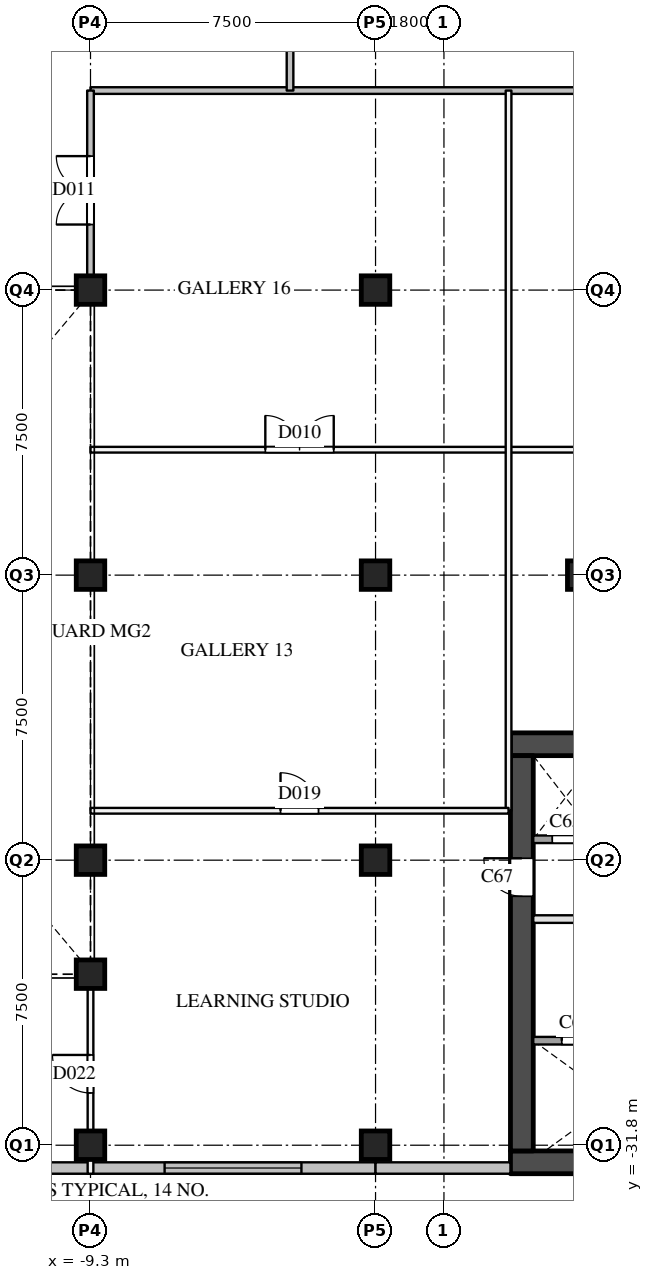
"""IFC4 building model, lengths in metres.
Left out: names, types, materials, properties, quantities, classifications, styles, units other than length and angle.
Written with IfcOpenShell. Run it as: python <this file> out.ifc"""

import sys

from ifc_helpers import new_model, si_unit, direction, frame, frame_2d, origin, origin_2d, place, context, subcontext, project, spatial, rectangle, extrude, element, fill, save


model = new_model("IFC4")
c1 = context("Model", 3, precision=1e-05, world=origin(), true_north=direction((0.0, 1.0)))
c2 = subcontext(c1, "Body", "Model", "MODEL_VIEW")
j1 = project(units=[si_unit("LENGTHUNIT", "METRE"), si_unit("PLANEANGLEUNIT", "RADIAN")], contexts=[c1])
p1 = place(None, origin())
s1 = spatial("IfcSite", under=j1, at=p1, CompositionType="ELEMENT")
p2 = place(p1, origin())
s2 = spatial("IfcBuilding", under=s1, at=p2, CompositionType="ELEMENT")
p3 = place(p2, frame((0.0, 0.0, 14.0)))
s3 = spatial("IfcBuildingStorey", under=s2, at=p3, CompositionType="ELEMENT", Elevation=14.0)
for number, where, z_axis, x_axis in (
    (1, (-9.3, -31.8, 0.0), (0.0, 0.0, 1.0), (1.0, 0.0, 0.0)),
    (2, (-9.3, -24.3, 0.0), (0.0, 0.0, 1.0), (1.0, 0.0, 0.0)),
    (3, (-9.3, -16.8, 0.0), (0.0, 0.0, 1.0), (1.0, 0.0, 0.0)),
    (4, (-9.3, -9.3, 0.0), (0.0, 0.0, 1.0), (1.0, 0.0, 0.0)),
    (5, (-1.8, -31.8, 0.0), (0.0, 0.0, 1.0), (1.0, 0.0, 0.0)),
):
    element("IfcColumn", number, at=place(p3, frame(where, z_axis=z_axis, x_axis=x_axis)), inside=s3, PredefinedType="COLUMN", context=c2, shape_type="SweptSolid", body=[
        extrude(rectangle(XDim=0.75, YDim=0.75, at=origin_2d()), origin(), (0.0, 0.0, 1.0), 7.0),
    ])
for number, where, z_axis, x_axis in (
    (6, (-1.8, -24.3, -0.41), (0.0, 0.0, 1.0), (1.0, 0.0, 0.0)),
    (7, (-1.8, -16.8, -0.41), (0.0, 0.0, 1.0), (1.0, 0.0, 0.0)),
    (8, (-1.8, -9.3, -0.41), (0.0, 0.0, 1.0), (1.0, 0.0, 0.0)),
):
    element("IfcColumn", number, at=place(p3, frame(where, z_axis=z_axis, x_axis=x_axis)), inside=s3, PredefinedType="COLUMN", context=c2, shape_type="SweptSolid", body=[
        extrude(rectangle(XDim=0.75, YDim=0.75, at=origin_2d()), origin(), (0.0, 0.0, 1.0), 7.41),
    ])
for number, where, z_axis, x_axis in (
    (9, (-9.3, -27.3, 0.0), (0.0, 0.0, 1.0), (1.0, 0.0, 0.0)),
    (10, (3.625, -16.8, 0.0), (0.0, 0.0, 1.0), (1.0, 0.0, 0.0)),
):
    element("IfcColumn", number, at=place(p3, frame(where, z_axis=z_axis, x_axis=x_axis)), inside=s3, PredefinedType="COLUMN", context=c2, shape_type="SweptSolid", body=[
        extrude(rectangle(XDim=0.75, YDim=0.75, at=origin_2d()), origin(), (0.0, 0.0, 1.0), 7.0),
    ])
p4 = place(p3, frame((-16.8, -32.4, 0.0), z_axis=(0.0, 0.0, 1.0), x_axis=(1.0, 0.0, 0.0)))
e11 = element("IfcWall", 11, at=p4, inside=s3, PredefinedType="SOLIDWALL", context=c2, shape_type="SweptSolid", body=[
    extrude(rectangle(XDim=7.5, YDim=0.3, at=frame_2d((3.75, 0.0))), origin(), (0.0, 0.0, 1.0), 6.59),
])
p5 = place(p4, frame((1.95, 0.0, 0.9)))
e12 = element("IfcOpeningElement", 12, at=p5, cuts=e11, PredefinedType="OPENING", context=c2, shape_type="SweptSolid", body=[
    extrude(rectangle(XDim=3.6, YDim=3.0, at=frame_2d((1.8, 1.5))), frame((0.0, 0.16, 0.0), z_axis=(0.0, -1.0, 0.0), x_axis=(1.0, 0.0, 0.0)), (0.0, 0.0, 1.0), 0.32),
])
p6 = place(p3, frame((-9.3, -32.4, 0.0), z_axis=(0.0, 0.0, 1.0), x_axis=(1.0, 0.0, 0.0)))
e13 = element("IfcWall", 13, at=p6, inside=s3, PredefinedType="SOLIDWALL", context=c2, shape_type="SweptSolid", body=[
    extrude(rectangle(XDim=7.5, YDim=0.3, at=frame_2d((3.75, 0.0))), origin(), (0.0, 0.0, 1.0), 6.59),
])
p7 = place(p6, frame((1.95, 0.0, 0.9)))
e14 = element("IfcOpeningElement", 14, at=p7, cuts=e13, PredefinedType="OPENING", context=c2, shape_type="SweptSolid", body=[
    extrude(rectangle(XDim=3.6, YDim=3.0, at=frame_2d((1.8, 1.5))), frame((0.0, 0.16, 0.0), z_axis=(0.0, -1.0, 0.0), x_axis=(1.0, 0.0, 0.0)), (0.0, 0.0, 1.0), 0.32),
])
p8 = place(p3, frame((-1.8, -32.4, 0.0), z_axis=(0.0, 0.0, 1.0), x_axis=(1.0, 0.0, 0.0)))
e15 = element("IfcWall", 15, at=p8, inside=s3, PredefinedType="SOLIDWALL", context=c2, shape_type="SweptSolid", body=[
    extrude(rectangle(XDim=3.55, YDim=0.3, at=frame_2d((1.775, 0.0))), origin(), (0.0, 0.0, 1.0), 6.59),
])
for number, where, z_axis, x_axis in (
    (16, (1.75, -32.25, 0.0), (0.0, 0.0, 1.0), (1.0, 0.0, 0.0)),
    (17, (1.75, -21.25, 0.0), (0.0, 0.0, 1.0), (1.0, 0.0, 0.0)),
):
    element("IfcWall", number, at=place(p3, frame(where, z_axis=z_axis, x_axis=x_axis)), inside=s3, PredefinedType="SHEAR", context=c2, shape_type="SweptSolid", body=[
        extrude(rectangle(XDim=12.2, YDim=0.6, at=frame_2d((6.1, 0.0))), origin(), (0.0, 0.0, 1.0), 6.59),
    ])
p9 = place(p3, frame((2.05, -31.95, 0.0), z_axis=(0.0, 0.0, 1.0), x_axis=(0.0, 1.0, 0.0)))
e18 = element("IfcWall", 18, at=p9, inside=s3, PredefinedType="SHEAR", context=c2, shape_type="SweptSolid", body=[
    extrude(rectangle(XDim=10.4, YDim=0.6, at=frame_2d((5.2, 0.0))), origin(), (0.0, 0.0, 1.0), 6.59),
])
p10 = place(p9, frame((6.7, 0.0, 0.0)))
e19 = element("IfcOpeningElement", 19, at=p10, cuts=e18, PredefinedType="OPENING", context=c2, shape_type="SweptSolid", body=[
    extrude(rectangle(XDim=1.0, YDim=2.1, at=frame_2d((0.5, 1.05))), frame((0.0, 0.31, 0.0), z_axis=(0.0, -1.0, 0.0), x_axis=(1.0, 0.0, 0.0)), (0.0, 0.0, 1.0), 0.62),
])
p11 = place(p3, frame((2.35, -29.05, 0.0), z_axis=(0.0, 0.0, 1.0), x_axis=(1.0, 0.0, 0.0)))
e20 = element("IfcWall", 20, at=p11, inside=s3, PredefinedType="SOLIDWALL", context=c2, shape_type="SweptSolid", body=[
    extrude(rectangle(XDim=4.3, YDim=0.2, at=frame_2d((2.15, 0.0))), origin(), (0.0, 0.0, 1.0), 6.59),
])
p12 = place(p11, frame((2.65, 0.0, 0.0)))
e21 = element("IfcOpeningElement", 21, at=p12, cuts=e20, PredefinedType="OPENING", context=c2, shape_type="SweptSolid", body=[
    extrude(rectangle(XDim=1.2, YDim=2.1, at=frame_2d((0.6, 1.05))), frame((0.0, 0.11, 0.0), z_axis=(0.0, -1.0, 0.0), x_axis=(1.0, 0.0, 0.0)), (0.0, 0.0, 1.0), 0.22),
])
p13 = place(p11, frame((0.75, 0.0, 0.0)))
e22 = element("IfcOpeningElement", 22, at=p13, cuts=e20, PredefinedType="OPENING", context=c2, shape_type="SweptSolid", body=[
    extrude(rectangle(XDim=0.7, YDim=2.1, at=frame_2d((0.35, 1.05))), frame((0.0, 0.11, 0.0), z_axis=(0.0, -1.0, 0.0), x_axis=(1.0, 0.0, 0.0)), (0.0, 0.0, 1.0), 0.22),
])
p14 = place(p3, frame((2.35, -25.85, 0.0), z_axis=(0.0, 0.0, 1.0), x_axis=(1.0, 0.0, 0.0)))
e23 = element("IfcWall", 23, at=p14, inside=s3, PredefinedType="PARTITIONING", context=c2, shape_type="SweptSolid", body=[
    extrude(rectangle(XDim=4.3, YDim=0.2, at=frame_2d((2.15, 0.0))), origin(), (0.0, 0.0, 1.0), 6.59),
])
p15 = place(p14, frame((1.15, 0.0, 0.0)))
e24 = element("IfcOpeningElement", 24, at=p15, cuts=e23, PredefinedType="OPENING", context=c2, shape_type="SweptSolid", body=[
    extrude(rectangle(XDim=1.8, YDim=2.1, at=frame_2d((0.9, 1.05))), frame((0.0, 0.11, 0.0), z_axis=(0.0, -1.0, 0.0), x_axis=(1.0, 0.0, 0.0)), (0.0, 0.0, 1.0), 0.22),
])
p16 = place(p3, frame((2.35, -23.75, 0.0), z_axis=(0.0, 0.0, 1.0), x_axis=(1.0, 0.0, 0.0)))
e25 = element("IfcWall", 25, at=p16, inside=s3, PredefinedType="SOLIDWALL", context=c2, shape_type="SweptSolid", body=[
    extrude(rectangle(XDim=1.7, YDim=0.2, at=frame_2d((0.85, 0.0))), origin(), (0.0, 0.0, 1.0), 6.59),
])
p17 = place(p16, frame((0.5, 0.0, 0.0)))
e26 = element("IfcOpeningElement", 26, at=p17, cuts=e25, PredefinedType="OPENING", context=c2, shape_type="SweptSolid", body=[
    extrude(rectangle(XDim=0.7, YDim=2.1, at=frame_2d((0.35, 1.05))), frame((0.0, 0.11, 0.0), z_axis=(0.0, -1.0, 0.0), x_axis=(1.0, 0.0, 0.0)), (0.0, 0.0, 1.0), 0.22),
])
p18 = place(p3, frame((-9.3, -4.05, 0.0), z_axis=(0.0, 0.0, 1.0), x_axis=(1.0, 0.0, 0.0)))
e27 = element("IfcWall", 27, at=p18, inside=s3, PredefinedType="PARTITIONING", context=c2, shape_type="SweptSolid", body=[
    extrude(rectangle(XDim=23.25, YDim=0.175, at=frame_2d((11.625, 0.0))), origin(), (0.0, 0.0, 1.0), 5.79),
])
p19 = place(p18, frame((16.225, 0.0, 0.0)))
e28 = element("IfcOpeningElement", 28, at=p19, cuts=e27, PredefinedType="OPENING", context=c2, shape_type="SweptSolid", body=[
    extrude(rectangle(XDim=1.8, YDim=2.1, at=frame_2d((0.9, 1.05))), frame((0.0, 0.097, 0.0), z_axis=(0.0, -1.0, 0.0), x_axis=(1.0, 0.0, 0.0)), (0.0, 0.0, 1.0), 0.195),
])
p20 = place(p3, frame((-9.3, -9.3, 0.0), z_axis=(0.0, 0.0, 1.0), x_axis=(0.0, 1.0, 0.0)))
e29 = element("IfcWall", 29, at=p20, inside=s3, PredefinedType="PARTITIONING", context=c2, shape_type="SweptSolid", body=[
    extrude(rectangle(XDim=5.25, YDim=0.175, at=frame_2d((2.625, 0.0))), origin(), (0.0, 0.0, 1.0), 5.79),
])
p21 = place(p20, frame((1.725, 0.0, 0.0)))
e30 = element("IfcOpeningElement", 30, at=p21, cuts=e29, PredefinedType="OPENING", context=c2, shape_type="SweptSolid", body=[
    extrude(rectangle(XDim=1.8, YDim=2.1, at=frame_2d((0.9, 1.05))), frame((0.0, 0.097, 0.0), z_axis=(0.0, -1.0, 0.0), x_axis=(1.0, 0.0, 0.0)), (0.0, 0.0, 1.0), 0.195),
])
p22 = place(p3, frame((-4.05, -4.05, 0.0), z_axis=(0.0, 0.0, 1.0), x_axis=(0.0, 1.0, 0.0)))
e31 = element("IfcWall", 31, at=p22, inside=s3, PredefinedType="PARTITIONING", context=c2, shape_type="SweptSolid", body=[
    extrude(rectangle(XDim=63.0, YDim=0.175, at=frame_2d((31.5, 0.0))), origin(), (0.0, 0.0, 1.0), 5.79),
])
p23 = place(p22, frame((7.125, 0.0, 0.0)))
e32 = element("IfcOpeningElement", 32, at=p23, cuts=e31, PredefinedType="OPENING", context=c2, shape_type="SweptSolid", body=[
    extrude(rectangle(XDim=1.8, YDim=2.1, at=frame_2d((0.9, 1.05))), frame((0.0, 0.097, 0.0), z_axis=(0.0, -1.0, 0.0), x_axis=(1.0, 0.0, 0.0)), (0.0, 0.0, 1.0), 0.195),
])
p24 = place(p3, frame((1.7, -23.0, 0.0), z_axis=(0.0, 0.0, 1.0), x_axis=(1.0, 0.0, 0.0)))
e33 = element("IfcWall", 33, at=p24, inside=s3, PredefinedType="PARTITIONING", context=c2, shape_type="SweptSolid", body=[
    extrude(rectangle(XDim=0.05, YDim=0.15, at=frame_2d((0.025, 0.0))), origin(), (0.0, 0.0, 1.0), 6.59),
])
p25 = place(p3, frame((-9.3, -13.5, 0.0), z_axis=(0.0, 0.0, 1.0), x_axis=(1.0, 0.0, 0.0)))
e34 = element("IfcWall", 34, at=p25, inside=s3, PredefinedType="PARTITIONING", context=c2, shape_type="SweptSolid", body=[
    extrude(rectangle(XDim=23.25, YDim=0.15, at=frame_2d((11.625, 0.0))), origin(), (0.0, 0.0, 1.0), 5.79),
])
p26 = place(p25, frame((16.225, 0.0, 0.0)))
e35 = element("IfcOpeningElement", 35, at=p26, cuts=e34, PredefinedType="OPENING", context=c2, shape_type="SweptSolid", body=[
    extrude(rectangle(XDim=1.8, YDim=2.1, at=frame_2d((0.9, 1.05))), frame((0.0, 0.085, 0.0), z_axis=(0.0, -1.0, 0.0), x_axis=(1.0, 0.0, 0.0)), (0.0, 0.0, 1.0), 0.17),
])
p27 = place(p25, frame((4.6, 0.0, 0.0)))
e36 = element("IfcOpeningElement", 36, at=p27, cuts=e34, PredefinedType="OPENING", context=c2, shape_type="SweptSolid", body=[
    extrude(rectangle(XDim=1.8, YDim=2.1, at=frame_2d((0.9, 1.05))), frame((0.0, 0.085, 0.0), z_axis=(0.0, -1.0, 0.0), x_axis=(1.0, 0.0, 0.0)), (0.0, 0.0, 1.0), 0.17),
])
p28 = place(p3, frame((1.7, -23.0, 0.0), z_axis=(0.0, 0.0, 1.0), x_axis=(0.0, 1.0, 0.0)))
e37 = element("IfcWall", 37, at=p28, inside=s3, PredefinedType="PARTITIONING", context=c2, shape_type="SweptSolid", body=[
    extrude(rectangle(XDim=18.95, YDim=0.15, at=frame_2d((9.475, 0.0))), origin(), (0.0, 0.0, 1.0), 5.79),
])
p29 = place(p3, frame((-9.3, -23.0, 0.0), z_axis=(0.0, 0.0, 1.0), x_axis=(1.0, 0.0, 0.0)))
e38 = element("IfcWall", 38, at=p29, inside=s3, PredefinedType="PARTITIONING", context=c2, shape_type="SweptSolid", body=[
    extrude(rectangle(XDim=11.0, YDim=0.15, at=frame_2d((5.5, 0.0))), origin(), (0.0, 0.0, 1.0), 5.79),
])
p30 = place(p29, frame((5.0, 0.0, 0.0)))
e39 = element("IfcOpeningElement", 39, at=p30, cuts=e38, PredefinedType="OPENING", context=c2, shape_type="SweptSolid", body=[
    extrude(rectangle(XDim=1.0, YDim=2.1, at=frame_2d((0.5, 1.05))), frame((0.0, 0.085, 0.0), z_axis=(0.0, -1.0, 0.0), x_axis=(1.0, 0.0, 0.0)), (0.0, 0.0, 1.0), 0.17),
])
p31 = place(p3, frame((-9.3, -32.55, 0.0), z_axis=(0.0, 0.0, 1.0), x_axis=(0.0, 1.0, 0.0)))
e40 = element("IfcWall", 40, at=p31, inside=s3, PredefinedType="PARTITIONING", context=c2, shape_type="SweptSolid", body=[
    extrude(rectangle(XDim=5.25, YDim=0.15, at=frame_2d((2.625, 0.0))), origin(), (0.0, 0.0, 1.0), 5.79),
])
p32 = place(p31, frame((2.125, 0.0, 0.0)))
e41 = element("IfcOpeningElement", 41, at=p32, cuts=e40, PredefinedType="OPENING", context=c2, shape_type="SweptSolid", body=[
    extrude(rectangle(XDim=1.0, YDim=2.1, at=frame_2d((0.5, 1.05))), frame((0.0, 0.085, 0.0), z_axis=(0.0, -1.0, 0.0), x_axis=(1.0, 0.0, 0.0)), (0.0, 0.0, 1.0), 0.17),
])
p33 = place(p7, origin())
e42 = element("IfcWindow", 42, at=p33, inside=s3, PartitioningType="SINGLE_PANEL", PredefinedType="WINDOW", context=c2, shape_type="SweptSolid", body=[
    extrude(rectangle(XDim=3.6, YDim=3.0, at=frame_2d((1.8, 1.5))), frame((0.0, 0.03, 0.0), z_axis=(0.0, -1.0, 0.0), x_axis=(1.0, 0.0, 0.0)), (0.0, 0.0, 1.0), 0.06),
])
fill(e14, e42)
p34 = place(p17, origin())
e43 = element("IfcDoor", 43, at=p34, inside=s3, OperationType="SINGLE_SWING_RIGHT", PredefinedType="DOOR", context=c2, shape_type="SweptSolid", body=[
    extrude(rectangle(XDim=0.7, YDim=2.1, at=frame_2d((0.35, 1.05))), frame((0.0, 0.025, 0.0), z_axis=(0.0, -1.0, 0.0), x_axis=(1.0, 0.0, 0.0)), (0.0, 0.0, 1.0), 0.05),
])
fill(e26, e43)
p35 = place(p13, origin())
e44 = element("IfcDoor", 44, at=p35, inside=s3, OperationType="SINGLE_SWING_LEFT", PredefinedType="DOOR", context=c2, shape_type="SweptSolid", body=[
    extrude(rectangle(XDim=0.7, YDim=2.1, at=frame_2d((0.35, 1.05))), frame((0.0, 0.025, 0.0), z_axis=(0.0, -1.0, 0.0), x_axis=(1.0, 0.0, 0.0)), (0.0, 0.0, 1.0), 0.05),
])
fill(e22, e44)
p36 = place(p10, origin())
e45 = element("IfcDoor", 45, at=p36, inside=s3, OperationType="SINGLE_SWING_RIGHT", PredefinedType="DOOR", context=c2, shape_type="SweptSolid", body=[
    extrude(rectangle(XDim=1.0, YDim=2.1, at=frame_2d((0.5, 1.05))), frame((0.0, 0.025, 0.0), z_axis=(0.0, -1.0, 0.0), x_axis=(1.0, 0.0, 0.0)), (0.0, 0.0, 1.0), 0.05),
])
fill(e19, e45)
p37 = place(p27, origin())
e46 = element("IfcDoor", 46, at=p37, inside=s3, OperationType="DOUBLE_DOOR_SINGLE_SWING", PredefinedType="DOOR", context=c2, shape_type="SweptSolid", body=[
    extrude(rectangle(XDim=1.8, YDim=2.1, at=frame_2d((0.9, 1.05))), frame((0.0, 0.025, 0.0), z_axis=(0.0, -1.0, 0.0), x_axis=(1.0, 0.0, 0.0)), (0.0, 0.0, 1.0), 0.05),
])
fill(e36, e46)
p38 = place(p21, origin())
e47 = element("IfcDoor", 47, at=p38, inside=s3, OperationType="DOUBLE_DOOR_SINGLE_SWING", PredefinedType="DOOR", context=c2, shape_type="SweptSolid", body=[
    extrude(rectangle(XDim=1.8, YDim=2.1, at=frame_2d((0.9, 1.05))), frame((0.0, 0.025, 0.0), z_axis=(0.0, -1.0, 0.0), x_axis=(1.0, 0.0, 0.0)), (0.0, 0.0, 1.0), 0.05),
])
fill(e30, e47)
p39 = place(p30, origin())
e48 = element("IfcDoor", 48, at=p39, inside=s3, OperationType="SINGLE_SWING_LEFT", PredefinedType="DOOR", context=c2, shape_type="SweptSolid", body=[
    extrude(rectangle(XDim=1.0, YDim=2.1, at=frame_2d((0.5, 1.05))), frame((0.0, 0.025, 0.0), z_axis=(0.0, -1.0, 0.0), x_axis=(1.0, 0.0, 0.0)), (0.0, 0.0, 1.0), 0.05),
])
fill(e39, e48)
p40 = place(p32, origin())
e49 = element("IfcDoor", 49, at=p40, inside=s3, OperationType="SINGLE_SWING_RIGHT", PredefinedType="DOOR", context=c2, shape_type="SweptSolid", body=[
    extrude(rectangle(XDim=1.0, YDim=2.1, at=frame_2d((0.5, 1.05))), frame((0.0, 0.025, 0.0), z_axis=(0.0, -1.0, 0.0), x_axis=(1.0, 0.0, 0.0)), (0.0, 0.0, 1.0), 0.05),
])
fill(e41, e49)
save(model, sys.argv[1])
